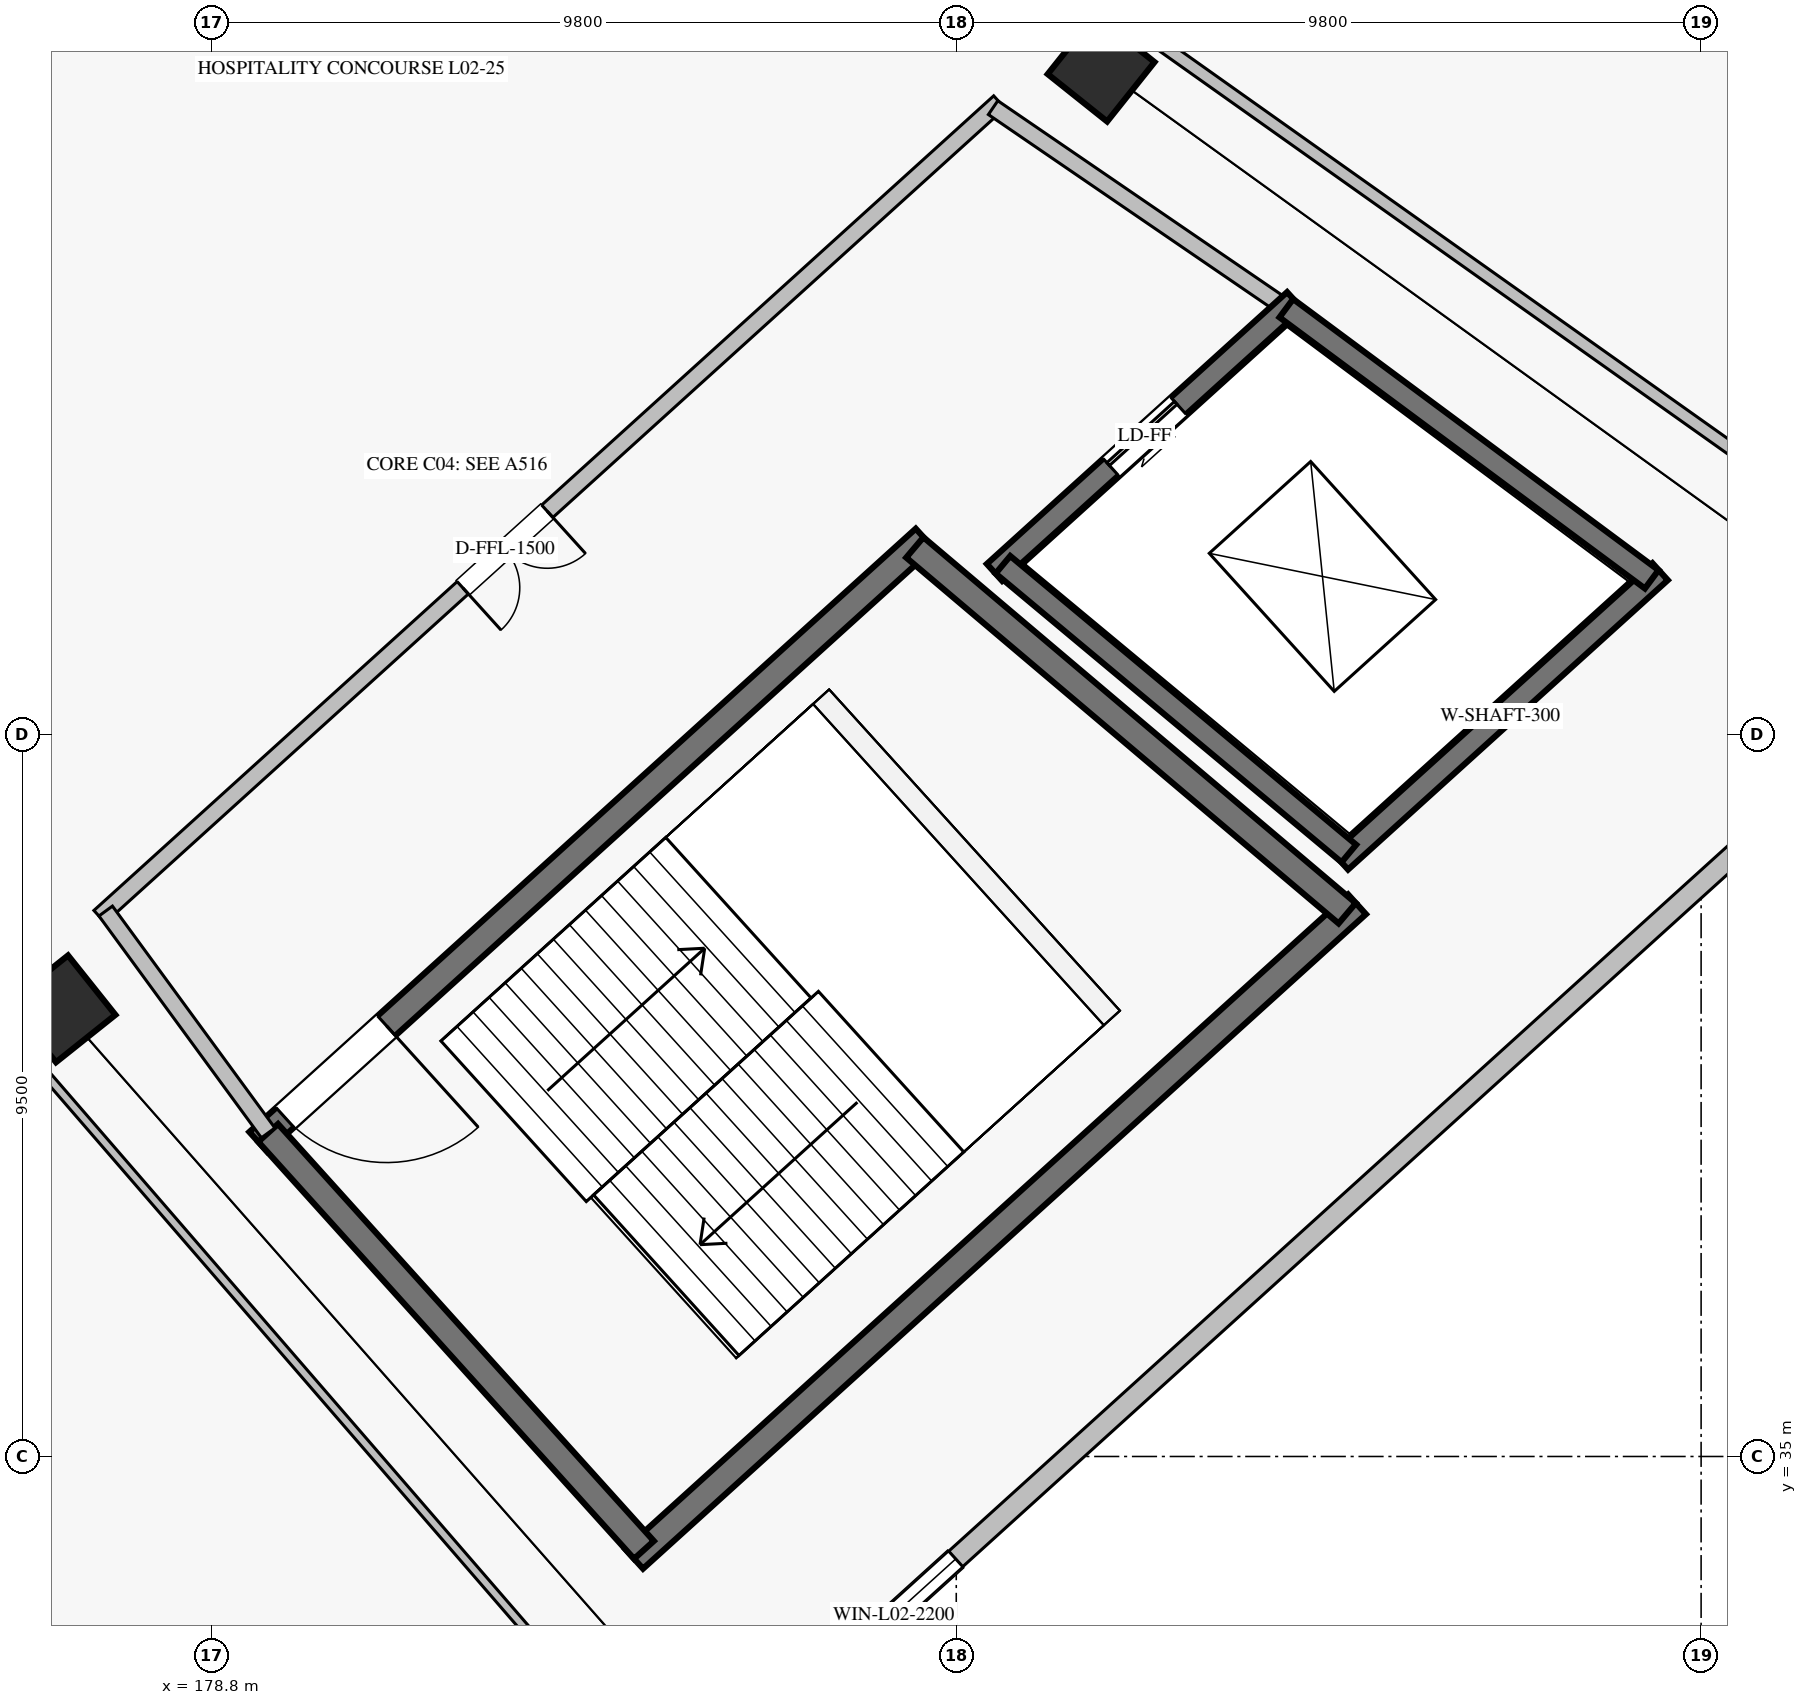
"""IFC4 building model, lengths in metres.
Left out: names, types, materials, properties, quantities, classifications, styles, units other than length and angle.
Written with IfcOpenShell. Run it as: python <this file> out.ifc"""

import sys

from ifc_helpers import new_model, si_unit, direction, frame, frame_2d, origin, origin_2d, place, context, subcontext, project, spatial, rectangle, extrude, element, fill, save


model = new_model("IFC4")
c1 = context("Model", 3, precision=1e-05, world=origin(), true_north=direction((0.0, 1.0)))
c2 = subcontext(c1, "Body", "Model", "MODEL_VIEW")
j1 = project(units=[si_unit("LENGTHUNIT", "METRE"), si_unit("PLANEANGLEUNIT", "RADIAN")], contexts=[c1])
p1 = place(None, origin())
s1 = spatial("IfcSite", under=j1, at=p1, CompositionType="ELEMENT")
p2 = place(p1, origin())
s2 = spatial("IfcBuilding", under=s1, at=p2, CompositionType="ELEMENT")
p3 = place(p2, frame((0.0, 0.0, 10.54)))
s3 = spatial("IfcBuildingStorey", under=s2, at=p3, CompositionType="ELEMENT", Elevation=10.54)
for number, where, z_axis, x_axis in (
    (1, (176.834, 40.889, 0.0), (0.0, 0.0, 1.0), (0.623, -0.782, 0.0)),
    (2, (190.506, 53.266, 0.0), (0.0, 0.0, 1.0), (0.782, -0.623, 0.0)),
):
    element("IfcColumn", number, at=place(p3, frame(where, z_axis=z_axis, x_axis=x_axis)), inside=s3, PredefinedType="COLUMN", context=c2, shape_type="SweptSolid", body=[
        extrude(rectangle(XDim=1.0, YDim=1.0, at=origin_2d()), origin(), (0.0, 0.0, 1.0), 5.1),
    ])
p4 = place(p3, frame((185.924, 31.236, 0.0), z_axis=(0.0, 0.0, 1.0), x_axis=(0.741352367697, 0.671115986183, 0.0)))
e3 = element("IfcWall", 3, at=p4, inside=s3, PredefinedType="SOLIDWALL", context=c2, shape_type="SweptSolid", body=[
    extrude(rectangle(XDim=20.564, YDim=0.275, at=frame_2d((10.282, 0.0))), origin(), (0.0, 0.0, 1.0), 4.138),
])
p5 = place(p4, frame((1.4, 0.0, 1.0)))
e4 = element("IfcOpeningElement", 4, at=p5, cuts=e3, PredefinedType="OPENING", context=c2, shape_type="SweptSolid", body=[
    extrude(rectangle(XDim=2.2, YDim=1.7, at=frame_2d((1.1, 0.85))), frame((0.0, 0.147, 0.0), z_axis=(0.0, -1.0, 0.0), x_axis=(1.0, 0.0, 0.0)), (0.0, 0.0, 1.0), 0.295),
])
p6 = place(p3, frame((179.417, 39.14, 0.0), z_axis=(0.0, 0.0, 1.0), x_axis=(0.741348929385, 0.671119784315, 0.0)))
e5 = element("IfcWall", 5, at=p6, inside=s3, PredefinedType="SHEAR", context=c2, shape_type="SweptSolid", body=[
    extrude(rectangle(XDim=11.826, YDim=0.35, at=frame_2d((5.913, 0.0))), origin(), (0.0, 0.0, 1.0), 4.84),
])
p7 = place(p6, frame((0.475, 0.0, 0.0)))
e6 = element("IfcOpeningElement", 6, at=p7, cuts=e5, PredefinedType="OPENING", context=c2, shape_type="SweptSolid", body=[
    extrude(rectangle(XDim=1.8, YDim=2.2, at=frame_2d((0.9, 1.1))), frame((0.0, 0.185, 0.0), z_axis=(0.0, -1.0, 0.0), x_axis=(1.0, 0.0, 0.0)), (0.0, 0.0, 1.0), 0.37),
])
p8 = place(p3, frame((184.361, 33.653, 0.0), z_axis=(0.0, 0.0, 1.0), x_axis=(0.741351373721, 0.671117084183, 0.0)))
e7 = element("IfcWall", 7, at=p8, inside=s3, PredefinedType="SHEAR", context=c2, shape_type="SweptSolid", body=[
    extrude(rectangle(XDim=12.83, YDim=0.35, at=frame_2d((6.415, 0.0))), origin(), (0.0, 0.0, 1.0), 4.84),
])
p9 = place(p3, frame((179.546, 39.257, 0.0), z_axis=(0.0, 0.0, 1.0), x_axis=(0.669463145673, -0.742845270958, 0.0)))
e8 = element("IfcWall", 8, at=p9, inside=s3, PredefinedType="SHEAR", context=c2, shape_type="SweptSolid", body=[
    extrude(rectangle(XDim=7.386, YDim=0.35, at=frame_2d((3.693, 0.0))), origin(), (0.0, 0.0, 1.0), 4.84),
])
p10 = place(p3, frame((188.055, 46.959, 0.0), z_axis=(0.0, 0.0, 1.0), x_axis=(0.763422324031, -0.64589964791, 0.0)))
e9 = element("IfcWall", 9, at=p10, inside=s3, PredefinedType="SHEAR", context=c2, shape_type="SweptSolid", body=[
    extrude(rectangle(XDim=7.452, YDim=0.35, at=frame_2d((3.726, 0.0))), origin(), (0.0, 0.0, 1.0), 4.84),
])
p11 = place(p3, frame((189.103, 46.631, 0.0), z_axis=(0.0, 0.0, 1.0), x_axis=(0.741350155641, 0.671118429736, 0.0)))
e10 = element("IfcWall", 10, at=p11, inside=s3, PredefinedType="SHEAR", context=c2, shape_type="SweptSolid", body=[
    extrude(rectangle(XDim=5.329, YDim=0.3, at=frame_2d((2.665, 0.0))), origin(), (0.0, 0.0, 1.0), 4.84),
])
p12 = place(p11, frame((2.065, 0.0, 0.0)))
e11 = element("IfcOpeningElement", 11, at=p12, cuts=e10, PredefinedType="OPENING", context=c2, shape_type="SweptSolid", body=[
    extrude(rectangle(XDim=1.2, YDim=2.2, at=frame_2d((0.6, 1.1))), frame((0.0, 0.16, 0.0), z_axis=(0.0, -1.0, 0.0), x_axis=(1.0, 0.0, 0.0)), (0.0, 0.0, 1.0), 0.32),
])
p13 = place(p3, frame((193.654, 42.832, 0.0), z_axis=(0.0, 0.0, 1.0), x_axis=(0.74134208775, 0.671127341815, 0.0)))
e12 = element("IfcWall", 12, at=p13, inside=s3, PredefinedType="SHEAR", context=c2, shape_type="SweptSolid", body=[
    extrude(rectangle(XDim=5.675, YDim=0.3, at=frame_2d((2.837, 0.0))), origin(), (0.0, 0.0, 1.0), 4.84),
])
p14 = place(p3, frame((189.214, 46.732, 0.0), z_axis=(0.0, 0.0, 1.0), x_axis=(0.767711354146, -0.640795815151, 0.0)))
e13 = element("IfcWall", 13, at=p14, inside=s3, PredefinedType="SHEAR", context=c2, shape_type="SweptSolid", body=[
    extrude(rectangle(XDim=5.929, YDim=0.3, at=frame_2d((2.964, 0.0))), origin(), (0.0, 0.0, 1.0), 4.84),
])
p15 = place(p3, frame((192.942, 50.107, 0.0), z_axis=(0.0, 0.0, 1.0), x_axis=(0.803101805449, -0.59584183311, 0.0)))
e14 = element("IfcWall", 14, at=p15, inside=s3, PredefinedType="SHEAR", context=c2, shape_type="SweptSolid", body=[
    extrude(rectangle(XDim=5.986, YDim=0.3, at=frame_2d((2.993, 0.0))), origin(), (0.0, 0.0, 1.0), 4.84),
])
p16 = place(p3, frame((177.327, 42.102, 0.0), z_axis=(0.0, 0.0, 1.0), x_axis=(0.741351035574, 0.671117457717, 0.0)))
e15 = element("IfcWall", 15, at=p16, inside=s3, PredefinedType="SOLIDWALL", context=c2, shape_type="SweptSolid", body=[
    extrude(rectangle(XDim=15.969, YDim=0.22, at=frame_2d((7.985, 0.0))), origin(), (0.0, 0.0, 1.0), 4.84),
])
p17 = place(p16, frame((6.447, 0.0, 0.0)))
e16 = element("IfcOpeningElement", 16, at=p17, cuts=e15, PredefinedType="OPENING", context=c2, shape_type="SweptSolid", body=[
    extrude(rectangle(XDim=1.5, YDim=2.2, at=frame_2d((0.75, 1.1))), frame((0.0, 0.12, 0.0), z_axis=(0.0, -1.0, 0.0), x_axis=(1.0, 0.0, 0.0)), (0.0, 0.0, 1.0), 0.24),
])
p18 = place(p3, frame((177.409, 42.176, 0.0), z_axis=(0.0, 0.0, 1.0), x_axis=(0.590836915359, -0.806791013491, 0.0)))
e17 = element("IfcWall", 17, at=p18, inside=s3, PredefinedType="SOLIDWALL", context=c2, shape_type="SweptSolid", body=[
    extrude(rectangle(XDim=3.618, YDim=0.22, at=frame_2d((1.809, 0.0))), origin(), (0.0, 0.0, 1.0), 4.84),
])
p19 = place(p3, frame((189.085, 52.746, 0.0), z_axis=(0.0, 0.0, 1.0), x_axis=(0.825385410642, -0.564569680287, 0.0)))
e18 = element("IfcWall", 18, at=p19, inside=s3, PredefinedType="SOLIDWALL", context=c2, shape_type="SweptSolid", body=[
    extrude(rectangle(XDim=4.674, YDim=0.22, at=frame_2d((2.337, 0.0))), origin(), (0.0, 0.0, 1.0), 4.84),
])
p20 = place(p3, frame((176.401, 40.28, 0.0), z_axis=(0.0, 0.0, 1.0), x_axis=(0.654293035882, -0.756241114458, 0.0)))
e19 = element("IfcWall", 19, at=p20, inside=s3, PredefinedType="PARTITIONING", context=c2, shape_type="SweptSolid", body=[
    extrude(rectangle(XDim=12.091, YDim=0.115, at=frame_2d((6.045, 0.0))), origin(), (0.0, 0.0, 1.0), 4.16),
])
p21 = place(p3, frame((172.042, 38.209, 0.0), z_axis=(0.0, 0.0, 1.0), x_axis=(0.609492992165, -0.792791455871, 0.0)))
e20 = element("IfcWall", 20, at=p21, inside=s3, PredefinedType="PARTITIONING", context=c2, shape_type="SweptSolid", body=[
    extrude(rectangle(XDim=11.921, YDim=0.1, at=frame_2d((5.96, 0.0))), origin(), (0.0, 0.0, 1.0), 4.16),
])
p22 = place(p3, frame((191.179, 53.658, 0.0), z_axis=(0.0, 0.0, 1.0), x_axis=(0.815753527099, -0.578399674122, 0.0)))
e21 = element("IfcWall", 21, at=p22, inside=s3, PredefinedType="PARTITIONING", context=c2, shape_type="SweptSolid", body=[
    extrude(rectangle(XDim=12.382, YDim=0.165, at=frame_2d((6.191, 0.0))), origin(), (0.0, 0.0, 1.0), 4.16),
])
p23 = place(p5, origin())
e22 = element("IfcWindow", 22, at=p23, inside=s3, PartitioningType="SINGLE_PANEL", PredefinedType="WINDOW", context=c2, shape_type="SweptSolid", body=[
    extrude(rectangle(XDim=2.2, YDim=1.7, at=frame_2d((1.1, 0.85))), frame((0.0, 0.03, 0.0), z_axis=(0.0, -1.0, 0.0), x_axis=(1.0, 0.0, 0.0)), (0.0, 0.0, 1.0), 0.06),
])
fill(e4, e22)
p24 = place(p7, frame((1.8, 0.0, 0.0), z_axis=(0.0, 0.0, 1.0), x_axis=(-1.0, 0.0, 0.0)))
e23 = element("IfcDoor", 23, at=p24, inside=s3, OperationType="SINGLE_SWING_LEFT", PredefinedType="DOOR", context=c2, shape_type="SweptSolid", body=[
    extrude(rectangle(XDim=1.8, YDim=2.2, at=frame_2d((0.9, 1.1))), frame((0.0, 0.025, 0.0), z_axis=(0.0, -1.0, 0.0), x_axis=(1.0, 0.0, 0.0)), (0.0, 0.0, 1.0), 0.05),
])
fill(e6, e23)
p25 = place(p12, origin())
e24 = element("IfcDoor", 24, at=p25, inside=s3, OperationType="SLIDING_TO_LEFT", PredefinedType="DOOR", context=c2, shape_type="SweptSolid", body=[
    extrude(rectangle(XDim=1.2, YDim=2.2, at=frame_2d((0.6, 1.1))), frame((0.0, 0.025, 0.0), z_axis=(0.0, -1.0, 0.0), x_axis=(1.0, 0.0, 0.0)), (0.0, 0.0, 1.0), 0.05),
])
fill(e11, e24)
p26 = place(p17, frame((1.5, 0.0, 0.0), z_axis=(0.0, 0.0, 1.0), x_axis=(-1.0, 0.0, 0.0)))
e25 = element("IfcDoor", 25, at=p26, inside=s3, OperationType="DOUBLE_DOOR_SINGLE_SWING", PredefinedType="DOOR", context=c2, shape_type="SweptSolid", body=[
    extrude(rectangle(XDim=1.5, YDim=2.2, at=frame_2d((0.75, 1.1))), frame((0.0, 0.025, 0.0), z_axis=(0.0, -1.0, 0.0), x_axis=(1.0, 0.0, 0.0)), (0.0, 0.0, 1.0), 0.05),
])
fill(e16, e25)
save(model, sys.argv[1])
